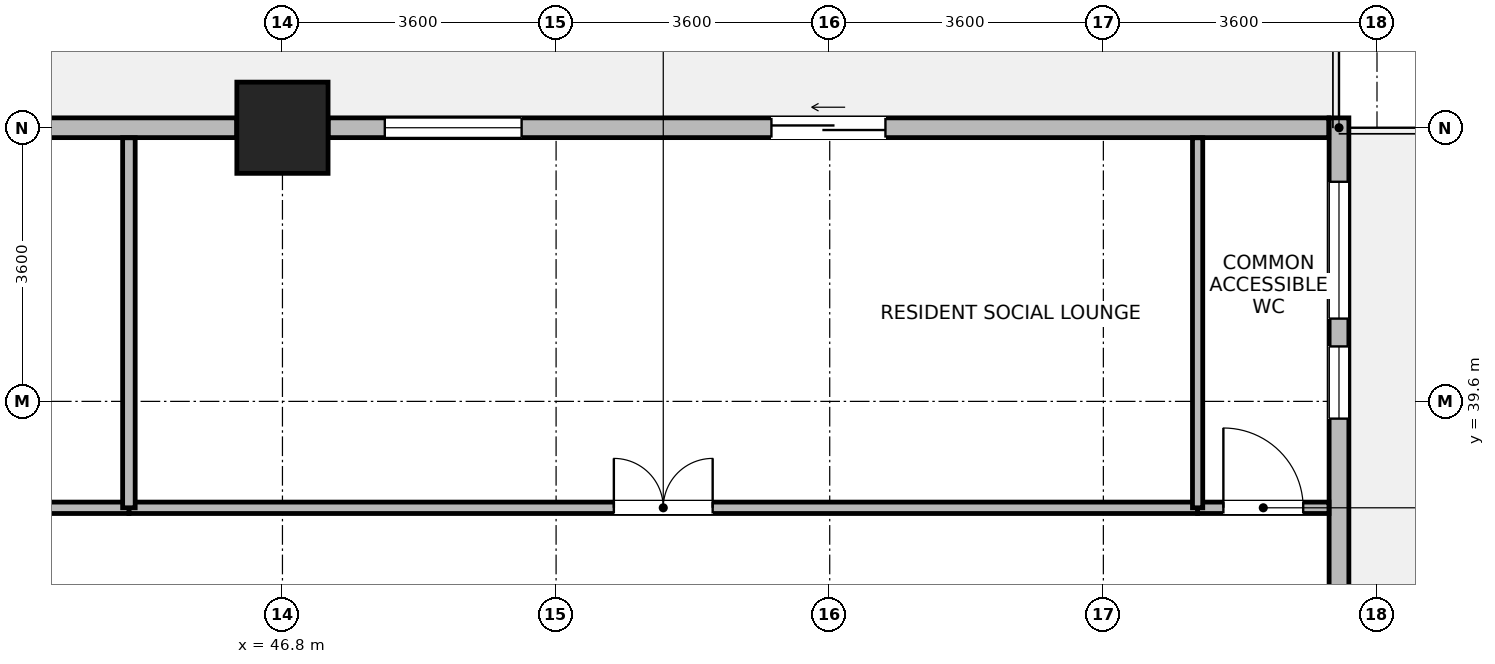
"""IFC4 building model, lengths in metres.
Left out: names, types, materials, properties, quantities, classifications, styles, units other than length and angle.
Written with IfcOpenShell. Run it as: python <this file> out.ifc"""

import sys

from ifc_helpers import new_model, si_unit, direction, frame, frame_2d, origin, origin_2d, place, context, subcontext, project, spatial, rectangle, extrude, source, transform, mapped, element, fill, save


model = new_model("IFC4")
c1 = context("Model", 3, precision=1e-05, world=origin(), true_north=direction((0.0, 1.0)))
c2 = subcontext(c1, "Body", "Model", "MODEL_VIEW")
j1 = project(units=[si_unit("LENGTHUNIT", "METRE"), si_unit("PLANEANGLEUNIT", "RADIAN")], contexts=[c1])
p1 = place(None, origin())
s1 = spatial("IfcSite", under=j1, at=p1, CompositionType="ELEMENT")
p2 = place(p1, origin())
s2 = spatial("IfcBuilding", under=s1, at=p2, CompositionType="ELEMENT")
p3 = place(p2, frame((0.0, 0.0, 100.8)))
s3 = spatial("IfcBuildingStorey", under=s2, at=p3, CompositionType="ELEMENT", Elevation=100.8)
m1 = source(origin(), c2, "Body", "SweptSolid", [
    extrude(rectangle(XDim=1.2, YDim=1.2, at=origin_2d()), origin(), (0.0, 0.0, 1.0), 3.7),
])
p4 = place(p3, frame((46.8, 43.2, 0.0), z_axis=(0.0, 0.0, 1.0), x_axis=(1.0, 0.0, 0.0)))
e1 = element("IfcColumn", 1, at=p4, inside=s3, PredefinedType="COLUMN", context=c2, shape_type="MappedRepresentation", body=[
    mapped(m1, transform((0.0, 0.0, 0.0), x_axis=(1.0, 0.0, 0.0), y_axis=(0.0, 1.0, 0.0), z_axis=(0.0, 0.0, 1.0), scale=1.0)),
])
p5 = place(p3, frame((60.7, 43.33, 0.0), z_axis=(0.0, 0.0, 1.0), x_axis=(0.0, -1.0, 0.0)))
e2 = element("IfcWall", 2, at=p5, inside=s3, PredefinedType="STANDARD", context=c2, shape_type="SweptSolid", body=[
    extrude(rectangle(XDim=6.964, YDim=0.26, at=frame_2d((3.482, 0.0))), origin(), (0.0, 0.0, 1.0), 3.43),
])
p6 = place(p5, frame((0.841, 0.0, 0.85)))
e3 = element("IfcOpeningElement", 3, at=p6, cuts=e2, PredefinedType="OPENING", context=c2, shape_type="SweptSolid", body=[
    extrude(rectangle(XDim=1.8, YDim=1.85, at=frame_2d((0.9, 0.925))), frame((0.0, 0.14, 0.0), z_axis=(0.0, -1.0, 0.0), x_axis=(1.0, 0.0, 0.0)), (0.0, 0.0, 1.0), 0.28),
])
p7 = place(p5, frame((3.007, 0.0, 0.85)))
e4 = element("IfcOpeningElement", 4, at=p7, cuts=e2, PredefinedType="OPENING", context=c2, shape_type="SweptSolid", body=[
    extrude(rectangle(XDim=0.95, YDim=1.75, at=frame_2d((0.475, 0.875))), frame((0.0, 0.14, 0.0), z_axis=(0.0, -1.0, 0.0), x_axis=(1.0, 0.0, 0.0)), (0.0, 0.0, 1.0), 0.28),
])
p8 = place(p3, frame((47.401, 43.2, 0.0), z_axis=(0.0, 0.0, 1.0), x_axis=(1.0, 0.0, 0.0)))
e5 = element("IfcWall", 5, at=p8, inside=s3, PredefinedType="STANDARD", context=c2, shape_type="SweptSolid", body=[
    extrude(rectangle(XDim=13.164, YDim=0.26, at=frame_2d((6.582, 0.0))), origin(), (0.0, 0.0, 1.0), 3.43),
])
p9 = place(p8, frame((5.832, 0.0, 0.0)))
e6 = element("IfcOpeningElement", 6, at=p9, cuts=e5, PredefinedType="OPENING", context=c2, shape_type="SweptSolid", body=[
    extrude(rectangle(XDim=1.5, YDim=2.15, at=frame_2d((0.75, 1.075))), frame((0.0, 0.14, 0.0), z_axis=(0.0, -1.0, 0.0), x_axis=(1.0, 0.0, 0.0)), (0.0, 0.0, 1.0), 0.28),
])
p10 = place(p8, frame((0.746, 0.0, 0.85)))
e7 = element("IfcOpeningElement", 7, at=p10, cuts=e5, PredefinedType="OPENING", context=c2, shape_type="SweptSolid", body=[
    extrude(rectangle(XDim=1.8, YDim=1.85, at=frame_2d((0.9, 0.925))), frame((0.0, 0.14, 0.0), z_axis=(0.0, -1.0, 0.0), x_axis=(1.0, 0.0, 0.0)), (0.0, 0.0, 1.0), 0.28),
])
p11 = place(p3, frame((36.601, 43.2, 0.0), z_axis=(0.0, 0.0, 1.0), x_axis=(1.0, 0.0, 0.0)))
e8 = element("IfcWall", 8, at=p11, inside=s3, PredefinedType="STANDARD", context=c2, shape_type="SweptSolid", body=[
    extrude(rectangle(XDim=9.598, YDim=0.26, at=frame_2d((4.799, 0.0))), origin(), (0.0, 0.0, 1.0), 2.98),
])
p12 = place(p11, frame((0.7, 0.0, 0.85)))
e9 = element("IfcOpeningElement", 9, at=p12, cuts=e8, PredefinedType="OPENING", context=c2, shape_type="SweptSolid", body=[
    extrude(rectangle(XDim=1.8, YDim=1.85, at=frame_2d((0.9, 0.925))), frame((0.0, 0.14, 0.0), z_axis=(0.0, -1.0, 0.0), x_axis=(1.0, 0.0, 0.0)), (0.0, 0.0, 1.0), 0.28),
])
p13 = place(p11, frame((3.899, 0.0, 0.85)))
e10 = element("IfcOpeningElement", 10, at=p13, cuts=e8, PredefinedType="OPENING", context=c2, shape_type="SweptSolid", body=[
    extrude(rectangle(XDim=1.8, YDim=1.85, at=frame_2d((0.9, 0.925))), frame((0.0, 0.14, 0.0), z_axis=(0.0, -1.0, 0.0), x_axis=(1.0, 0.0, 0.0)), (0.0, 0.0, 1.0), 0.28),
])
p14 = place(p3, frame((44.78, 38.2, 0.0), z_axis=(0.0, 0.0, 1.0), x_axis=(1.0, 0.0, 0.0)))
e11 = element("IfcWall", 11, at=p14, inside=s3, PredefinedType="PARTITIONING", context=c2, shape_type="SweptSolid", body=[
    extrude(rectangle(XDim=14.06, YDim=0.15, at=frame_2d((7.03, 0.0))), origin(), (0.0, 0.0, 1.0), 3.43),
])
p15 = place(p14, frame((6.38, 0.0, 0.0)))
e12 = element("IfcOpeningElement", 12, at=p15, cuts=e11, PredefinedType="OPENING", context=c2, shape_type="SweptSolid", body=[
    extrude(rectangle(XDim=1.3, YDim=2.12, at=frame_2d((0.65, 1.06))), frame((0.0, 0.085, 0.0), z_axis=(0.0, -1.0, 0.0), x_axis=(1.0, 0.0, 0.0)), (0.0, 0.0, 1.0), 0.17),
])
p16 = place(p3, frame((32.62, 38.2, 0.0), z_axis=(0.0, 0.0, 1.0), x_axis=(1.0, 0.0, 0.0)))
e13 = element("IfcWall", 13, at=p16, inside=s3, PredefinedType="PARTITIONING", context=c2, shape_type="SweptSolid", body=[
    extrude(rectangle(XDim=12.16, YDim=0.15, at=frame_2d((6.08, 0.0))), origin(), (0.0, 0.0, 1.0), 3.43),
])
p17 = place(p16, frame((5.63, 0.0, 0.0)))
e14 = element("IfcOpeningElement", 14, at=p17, cuts=e13, PredefinedType="OPENING", context=c2, shape_type="SweptSolid", body=[
    extrude(rectangle(XDim=0.9, YDim=2.08, at=frame_2d((0.45, 1.04))), frame((0.0, 0.085, 0.0), z_axis=(0.0, -1.0, 0.0), x_axis=(1.0, 0.0, 0.0)), (0.0, 0.0, 1.0), 0.17),
])
p18 = place(p3, frame((58.84, 38.2, 0.0), z_axis=(0.0, 0.0, 1.0), x_axis=(1.0, 0.0, 0.0)))
e15 = element("IfcWall", 15, at=p18, inside=s3, PredefinedType="PARTITIONING", context=c2, shape_type="SweptSolid", body=[
    extrude(rectangle(XDim=1.728, YDim=0.15, at=frame_2d((0.864, 0.0))), origin(), (0.0, 0.0, 1.0), 3.43),
])
p19 = place(p18, frame((0.339, 0.0, 0.0)))
e16 = element("IfcOpeningElement", 16, at=p19, cuts=e15, PredefinedType="OPENING", context=c2, shape_type="SweptSolid", body=[
    extrude(rectangle(XDim=1.05, YDim=2.12, at=frame_2d((0.525, 1.06))), frame((0.0, 0.085, 0.0), z_axis=(0.0, -1.0, 0.0), x_axis=(1.0, 0.0, 0.0)), (0.0, 0.0, 1.0), 0.17),
])
p20 = place(p3, frame((44.78, 38.2, 0.0), z_axis=(0.0, 0.0, 1.0), x_axis=(0.0, 1.0, 0.0)))
e17 = element("IfcWall", 17, at=p20, inside=s3, PredefinedType="PARTITIONING", context=c2, shape_type="SweptSolid", body=[
    extrude(rectangle(XDim=4.868, YDim=0.165, at=frame_2d((2.434, 0.0))), origin(), (0.0, 0.0, 1.0), 3.43),
])
p21 = place(p3, frame((58.84, 38.2, 0.0), z_axis=(0.0, 0.0, 1.0), x_axis=(0.0, 1.0, 0.0)))
e18 = element("IfcWall", 18, at=p21, inside=s3, PredefinedType="PARTITIONING", context=c2, shape_type="SweptSolid", body=[
    extrude(rectangle(XDim=4.868, YDim=0.135, at=frame_2d((2.434, 0.0))), origin(), (0.0, 0.0, 1.0), 3.43),
])
p22 = place(p6, origin())
e19 = element("IfcWindow", 19, at=p22, inside=s3, PartitioningType="SINGLE_PANEL", PredefinedType="WINDOW", context=c2, shape_type="SweptSolid", body=[
    extrude(rectangle(XDim=1.8, YDim=1.85, at=frame_2d((0.9, 0.925))), frame((0.0, 0.03, 0.0), z_axis=(0.0, -1.0, 0.0), x_axis=(1.0, 0.0, 0.0)), (0.0, 0.0, 1.0), 0.06),
])
fill(e3, e19)
p23 = place(p7, origin())
e20 = element("IfcWindow", 20, at=p23, inside=s3, PartitioningType="SINGLE_PANEL", PredefinedType="WINDOW", context=c2, shape_type="SweptSolid", body=[
    extrude(rectangle(XDim=0.95, YDim=1.75, at=frame_2d((0.475, 0.875))), frame((0.0, 0.03, 0.0), z_axis=(0.0, -1.0, 0.0), x_axis=(1.0, 0.0, 0.0)), (0.0, 0.0, 1.0), 0.06),
])
fill(e4, e20)
p24 = place(p9, origin())
e21 = element("IfcDoor", 21, at=p24, inside=s3, OperationType="SLIDING_TO_LEFT", PredefinedType="DOOR", context=c2, shape_type="SweptSolid", body=[
    extrude(rectangle(XDim=1.5, YDim=2.15, at=frame_2d((0.75, 1.075))), frame((0.0, 0.025, 0.0), z_axis=(0.0, -1.0, 0.0), x_axis=(1.0, 0.0, 0.0)), (0.0, 0.0, 1.0), 0.05),
])
fill(e6, e21)
p25 = place(p10, origin())
e22 = element("IfcWindow", 22, at=p25, inside=s3, PartitioningType="SINGLE_PANEL", PredefinedType="WINDOW", context=c2, shape_type="SweptSolid", body=[
    extrude(rectangle(XDim=1.8, YDim=1.85, at=frame_2d((0.9, 0.925))), frame((0.0, 0.03, 0.0), z_axis=(0.0, -1.0, 0.0), x_axis=(1.0, 0.0, 0.0)), (0.0, 0.0, 1.0), 0.06),
])
fill(e7, e22)
p26 = place(p15, origin())
e23 = element("IfcDoor", 23, at=p26, inside=s3, OperationType="DOUBLE_DOOR_SINGLE_SWING", PredefinedType="DOOR", context=c2, shape_type="SweptSolid", body=[
    extrude(rectangle(XDim=1.3, YDim=2.12, at=frame_2d((0.65, 1.06))), frame((0.0, 0.025, 0.0), z_axis=(0.0, -1.0, 0.0), x_axis=(1.0, 0.0, 0.0)), (0.0, 0.0, 1.0), 0.05),
])
fill(e12, e23)
p27 = place(p19, origin())
e24 = element("IfcDoor", 24, at=p27, inside=s3, OperationType="SINGLE_SWING_LEFT", PredefinedType="DOOR", context=c2, shape_type="SweptSolid", body=[
    extrude(rectangle(XDim=1.05, YDim=2.12, at=frame_2d((0.525, 1.06))), frame((0.0, 0.025, 0.0), z_axis=(0.0, -1.0, 0.0), x_axis=(1.0, 0.0, 0.0)), (0.0, 0.0, 1.0), 0.05),
])
fill(e16, e24)
save(model, sys.argv[1])
